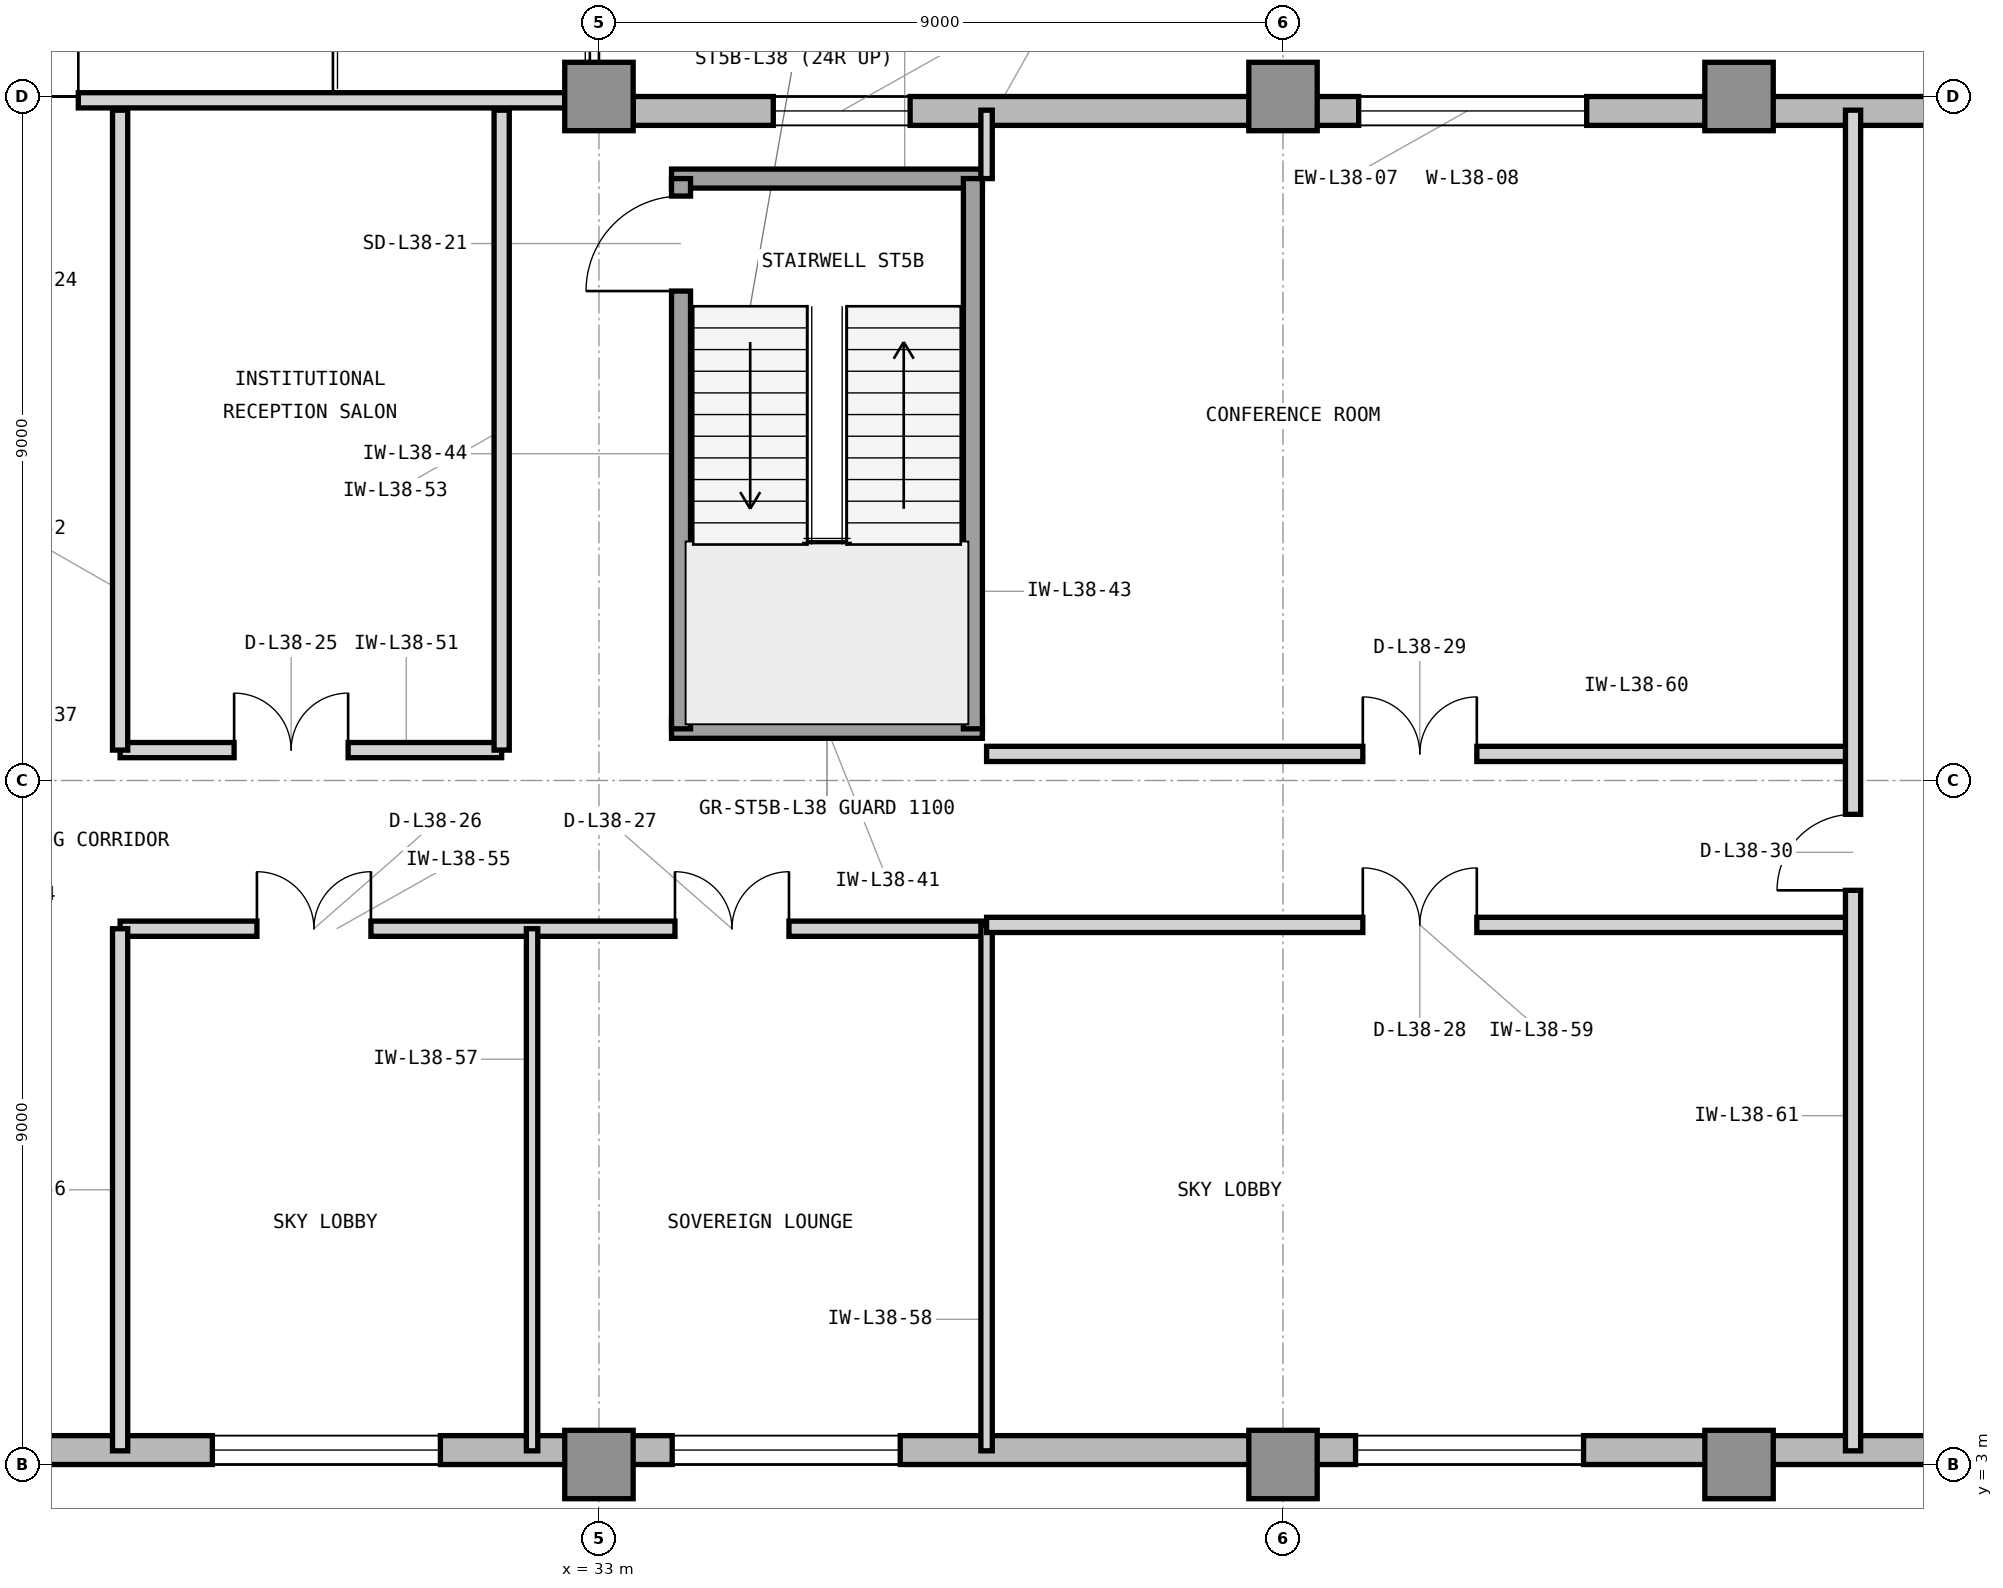
"""IFC4 building model, lengths in metres.
Left out: names, types, materials, properties, quantities, classifications, styles, units other than length and angle.
Written with IfcOpenShell. Run it as: python <this file> out.ifc"""

import sys

from ifc_helpers import new_model, si_unit, direction, frame, frame_2d, origin, origin_2d, place, context, subcontext, project, spatial, rectangle, extrude, element, fill, save


model = new_model("IFC4")
c1 = context("Model", 3, precision=1e-05, world=origin(), true_north=direction((0.0, 1.0)))
c2 = subcontext(c1, "Body", "Model", "MODEL_VIEW")
j1 = project(units=[si_unit("LENGTHUNIT", "METRE"), si_unit("PLANEANGLEUNIT", "RADIAN")], contexts=[c1])
p1 = place(None, origin())
s1 = spatial("IfcSite", under=j1, at=p1, CompositionType="ELEMENT")
p2 = place(p1, origin())
s2 = spatial("IfcBuilding", under=s1, at=p2, CompositionType="ELEMENT")
p3 = place(p2, frame((0.0, 0.0, 160.2)))
s3 = spatial("IfcBuildingStorey", under=s2, at=p3, CompositionType="ELEMENT", Elevation=160.2)
for number, where, z_axis, x_axis in (
    (1, (33.0, 3.0, 0.0), (0.0, 0.0, 1.0), (1.0, 0.0, 0.0)),
    (2, (33.0, 21.0, 0.0), (0.0, 0.0, 1.0), (1.0, 0.0, 0.0)),
    (3, (42.0, 3.0, 0.0), (0.0, 0.0, 1.0), (1.0, 0.0, 0.0)),
    (4, (42.0, 21.0, 0.0), (0.0, 0.0, 1.0), (1.0, 0.0, 0.0)),
    (5, (48.0, 3.0, 0.0), (0.0, 0.0, 1.0), (1.0, 0.0, 0.0)),
    (6, (48.0, 21.0, 0.0), (0.0, 0.0, 1.0), (1.0, 0.0, 0.0)),
):
    element("IfcColumn", number, at=place(p3, frame(where, z_axis=z_axis, x_axis=x_axis)), inside=s3, PredefinedType="COLUMN", context=c2, shape_type="SweptSolid", body=[
        extrude(rectangle(XDim=0.9, YDim=0.9, at=origin_2d()), origin(), (0.0, 0.0, 1.0), 4.2),
    ])
p4 = place(p3, frame((23.9, 3.19, 0.0), z_axis=(0.0, 0.0, 1.0), x_axis=(1.0, 0.0, 0.0)))
e7 = element("IfcWall", 7, at=p4, inside=s3, PredefinedType="STANDARD", context=c2, shape_type="SweptSolid", body=[
    extrude(rectangle(XDim=31.5, YDim=0.38, at=frame_2d((15.75, 0.0))), origin(), (0.0, 0.0, 1.0), 4.0),
])
p5 = place(p4, frame((4.014, 0.0, 0.7)))
e8 = element("IfcOpeningElement", 8, at=p5, cuts=e7, PredefinedType="OPENING", context=c2, shape_type="SweptSolid", body=[
    extrude(rectangle(XDim=3.0, YDim=2.6, at=frame_2d((1.5, 1.3))), frame((0.0, 0.2, 0.0), z_axis=(0.0, -1.0, 0.0), x_axis=(1.0, 0.0, 0.0)), (0.0, 0.0, 1.0), 0.4),
])
p6 = place(p4, frame((10.064, 0.0, 0.7)))
e9 = element("IfcOpeningElement", 9, at=p6, cuts=e7, PredefinedType="OPENING", context=c2, shape_type="SweptSolid", body=[
    extrude(rectangle(XDim=3.0, YDim=2.6, at=frame_2d((1.5, 1.3))), frame((0.0, 0.2, 0.0), z_axis=(0.0, -1.0, 0.0), x_axis=(1.0, 0.0, 0.0)), (0.0, 0.0, 1.0), 0.4),
])
p7 = place(p4, frame((19.054, 0.0, 0.7)))
e10 = element("IfcOpeningElement", 10, at=p7, cuts=e7, PredefinedType="OPENING", context=c2, shape_type="SweptSolid", body=[
    extrude(rectangle(XDim=3.0, YDim=2.6, at=frame_2d((1.5, 1.3))), frame((0.0, 0.2, 0.0), z_axis=(0.0, -1.0, 0.0), x_axis=(1.0, 0.0, 0.0)), (0.0, 0.0, 1.0), 0.4),
])
p8 = place(p3, frame((55.4, 20.81, 0.0), z_axis=(0.0, 0.0, 1.0), x_axis=(-1.0, 0.0, 0.0)))
e11 = element("IfcWall", 11, at=p8, inside=s3, PredefinedType="STANDARD", context=c2, shape_type="SweptSolid", body=[
    extrude(rectangle(XDim=21.95, YDim=0.38, at=frame_2d((10.975, 0.0))), origin(), (0.0, 0.0, 1.0), 4.0),
])
p9 = place(p8, frame((18.306, 0.0, 0.85)))
e12 = element("IfcOpeningElement", 12, at=p9, cuts=e11, PredefinedType="OPENING", context=c2, shape_type="SweptSolid", body=[
    extrude(rectangle(XDim=1.8, YDim=2.25, at=frame_2d((0.9, 1.125))), frame((0.0, 0.2, 0.0), z_axis=(0.0, -1.0, 0.0), x_axis=(1.0, 0.0, 0.0)), (0.0, 0.0, 1.0), 0.4),
])
p10 = place(p8, frame((9.404, 0.0, 0.7)))
e13 = element("IfcOpeningElement", 13, at=p10, cuts=e11, PredefinedType="OPENING", context=c2, shape_type="SweptSolid", body=[
    extrude(rectangle(XDim=3.0, YDim=2.6, at=frame_2d((1.5, 1.3))), frame((0.0, 0.2, 0.0), z_axis=(0.0, -1.0, 0.0), x_axis=(1.0, 0.0, 0.0)), (0.0, 0.0, 1.0), 0.4),
])
for number, where, z_axis, x_axis in (
    (14, (33.955, 12.68, 0.0), (0.0, 0.0, 1.0), (1.0, 0.0, 0.0)),
    (15, (33.955, 19.92, 0.0), (0.0, 0.0, 1.0), (1.0, 0.0, 0.0)),
):
    element("IfcWall", number, at=place(p3, frame(where, z_axis=z_axis, x_axis=x_axis)), inside=s3, PredefinedType="SHEAR", context=c2, shape_type="SweptSolid", body=[
        extrude(rectangle(XDim=4.09, YDim=0.25, at=frame_2d((2.045, 0.0))), origin(), (0.0, 0.0, 1.0), 4.2),
    ])
p11 = place(p3, frame((37.92, 12.68, 0.0), z_axis=(0.0, 0.0, 1.0), x_axis=(0.0, 1.0, 0.0)))
e16 = element("IfcWall", 16, at=p11, inside=s3, PredefinedType="SHEAR", context=c2, shape_type="SweptSolid", body=[
    extrude(rectangle(XDim=7.24, YDim=0.25, at=frame_2d((3.62, 0.0))), origin(), (0.0, 0.0, 1.0), 4.2),
])
p12 = place(p3, frame((34.08, 12.68, 0.0), z_axis=(0.0, 0.0, 1.0), x_axis=(0.0, 1.0, 0.0)))
e17 = element("IfcWall", 17, at=p12, inside=s3, PredefinedType="SHEAR", context=c2, shape_type="SweptSolid", body=[
    extrude(rectangle(XDim=7.24, YDim=0.25, at=frame_2d((3.62, 0.0))), origin(), (0.0, 0.0, 1.0), 4.2),
])
p13 = place(p12, frame((5.76, 0.0, 0.0)))
e18 = element("IfcOpeningElement", 18, at=p13, cuts=e17, PredefinedType="OPENING", context=c2, shape_type="SweptSolid", body=[
    extrude(rectangle(XDim=1.25, YDim=2.2, at=frame_2d((0.625, 1.1))), frame((0.0, 0.135, 0.0), z_axis=(0.0, -1.0, 0.0), x_axis=(1.0, 0.0, 0.0)), (0.0, 0.0, 1.0), 0.27),
])
p14 = place(p3, frame((24.05, 20.95, 0.0), z_axis=(0.0, 0.0, 1.0), x_axis=(1.0, 0.0, 0.0)))
e19 = element("IfcWall", 19, at=p14, inside=s3, PredefinedType="PARTITIONING", context=c2, shape_type="SweptSolid", body=[
    extrude(rectangle(XDim=8.5, YDim=0.2, at=frame_2d((4.25, 0.0))), origin(), (0.0, 0.0, 1.0), 3.386),
])
p15 = place(p14, frame((0.6, 0.0, 0.0)))
e20 = element("IfcOpeningElement", 20, at=p15, cuts=e19, PredefinedType="OPENING", context=c2, shape_type="SweptSolid", body=[
    extrude(rectangle(XDim=1.5, YDim=2.3, at=frame_2d((0.75, 1.15))), frame((0.0, 0.11, 0.0), z_axis=(0.0, -1.0, 0.0), x_axis=(1.0, 0.0, 0.0)), (0.0, 0.0, 1.0), 0.22),
])
p16 = place(p3, frame((26.7, 12.4, 0.0), z_axis=(0.0, 0.0, 1.0), x_axis=(1.0, 0.0, 0.0)))
e21 = element("IfcWall", 21, at=p16, inside=s3, PredefinedType="PARTITIONING", context=c2, shape_type="SweptSolid", body=[
    extrude(rectangle(XDim=5.02, YDim=0.2, at=frame_2d((2.51, 0.0))), origin(), (0.0, 0.0, 1.0), 3.93),
])
p17 = place(p16, frame((1.5, 0.0, 0.0)))
e22 = element("IfcOpeningElement", 22, at=p17, cuts=e21, PredefinedType="OPENING", context=c2, shape_type="SweptSolid", body=[
    extrude(rectangle(XDim=1.5, YDim=2.3, at=frame_2d((0.75, 1.15))), frame((0.0, 0.11, 0.0), z_axis=(0.0, -1.0, 0.0), x_axis=(1.0, 0.0, 0.0)), (0.0, 0.0, 1.0), 0.22),
])
for number, where, z_axis, x_axis in (
    (23, (26.7, 12.4, 0.0), (0.0, 0.0, 1.0), (0.0, 1.0, 0.0)),
    (24, (31.72, 12.4, 0.0), (0.0, 0.0, 1.0), (0.0, 1.0, 0.0)),
):
    element("IfcWall", number, at=place(p3, frame(where, z_axis=z_axis, x_axis=x_axis)), inside=s3, PredefinedType="PARTITIONING", context=c2, shape_type="SweptSolid", body=[
        extrude(rectangle(XDim=8.42, YDim=0.2, at=frame_2d((4.21, 0.0))), origin(), (0.0, 0.0, 1.0), 3.93),
    ])
p18 = place(p3, frame((38.1, 19.92, 0.0), z_axis=(0.0, 0.0, 1.0), x_axis=(0.0, 1.0, 0.0)))
e25 = element("IfcWall", 25, at=p18, inside=s3, PredefinedType="PARTITIONING", context=c2, shape_type="SweptSolid", body=[
    extrude(rectangle(XDim=0.9, YDim=0.15, at=frame_2d((0.45, 0.0))), origin(), (0.0, 0.0, 1.0), 3.93),
])
p19 = place(p3, frame((26.7, 10.05, 0.0), z_axis=(0.0, 0.0, 1.0), x_axis=(1.0, 0.0, 0.0)))
e26 = element("IfcWall", 26, at=p19, inside=s3, PredefinedType="PARTITIONING", context=c2, shape_type="SweptSolid", body=[
    extrude(rectangle(XDim=11.4, YDim=0.2, at=frame_2d((5.7, 0.0))), origin(), (0.0, 0.0, 1.0), 3.93),
])
p20 = place(p19, frame((1.8, 0.0, 0.0)))
e27 = element("IfcOpeningElement", 27, at=p20, cuts=e26, PredefinedType="OPENING", context=c2, shape_type="SweptSolid", body=[
    extrude(rectangle(XDim=1.5, YDim=2.3, at=frame_2d((0.75, 1.15))), frame((0.0, 0.11, 0.0), z_axis=(0.0, -1.0, 0.0), x_axis=(1.0, 0.0, 0.0)), (0.0, 0.0, 1.0), 0.22),
])
p21 = place(p19, frame((7.3, 0.0, 0.0)))
e28 = element("IfcOpeningElement", 28, at=p21, cuts=e26, PredefinedType="OPENING", context=c2, shape_type="SweptSolid", body=[
    extrude(rectangle(XDim=1.5, YDim=2.3, at=frame_2d((0.75, 1.15))), frame((0.0, 0.11, 0.0), z_axis=(0.0, -1.0, 0.0), x_axis=(1.0, 0.0, 0.0)), (0.0, 0.0, 1.0), 0.22),
])
p22 = place(p3, frame((26.7, 3.18, 0.0), z_axis=(0.0, 0.0, 1.0), x_axis=(0.0, 1.0, 0.0)))
e29 = element("IfcWall", 29, at=p22, inside=s3, PredefinedType="PARTITIONING", context=c2, shape_type="SweptSolid", body=[
    extrude(rectangle(XDim=6.87, YDim=0.2, at=frame_2d((3.435, 0.0))), origin(), (0.0, 0.0, 1.0), 3.93),
])
p23 = place(p3, frame((32.12, 3.18, 0.0), z_axis=(0.0, 0.0, 1.0), x_axis=(0.0, 1.0, 0.0)))
e30 = element("IfcWall", 30, at=p23, inside=s3, PredefinedType="PARTITIONING", context=c2, shape_type="SweptSolid", body=[
    extrude(rectangle(XDim=6.87, YDim=0.15, at=frame_2d((3.435, 0.0))), origin(), (0.0, 0.0, 1.0), 3.93),
])
p24 = place(p3, frame((38.1, 3.18, 0.0), z_axis=(0.0, 0.0, 1.0), x_axis=(0.0, 1.0, 0.0)))
e31 = element("IfcWall", 31, at=p24, inside=s3, PredefinedType="PARTITIONING", context=c2, shape_type="SweptSolid", body=[
    extrude(rectangle(XDim=6.92, YDim=0.15, at=frame_2d((3.46, 0.0))), origin(), (0.0, 0.0, 1.0), 3.93),
])
p25 = place(p3, frame((38.1, 10.1, 0.0), z_axis=(0.0, 0.0, 1.0), x_axis=(1.0, 0.0, 0.0)))
e32 = element("IfcWall", 32, at=p25, inside=s3, PredefinedType="PARTITIONING", context=c2, shape_type="SweptSolid", body=[
    extrude(rectangle(XDim=11.4, YDim=0.2, at=frame_2d((5.7, 0.0))), origin(), (0.0, 0.0, 1.0), 3.93),
])
p26 = place(p25, frame((4.95, 0.0, 0.0)))
e33 = element("IfcOpeningElement", 33, at=p26, cuts=e32, PredefinedType="OPENING", context=c2, shape_type="SweptSolid", body=[
    extrude(rectangle(XDim=1.5, YDim=2.3, at=frame_2d((0.75, 1.15))), frame((0.0, 0.11, 0.0), z_axis=(0.0, -1.0, 0.0), x_axis=(1.0, 0.0, 0.0)), (0.0, 0.0, 1.0), 0.22),
])
p27 = place(p3, frame((38.1, 12.35, 0.0), z_axis=(0.0, 0.0, 1.0), x_axis=(1.0, 0.0, 0.0)))
e34 = element("IfcWall", 34, at=p27, inside=s3, PredefinedType="PARTITIONING", context=c2, shape_type="SweptSolid", body=[
    extrude(rectangle(XDim=11.4, YDim=0.2, at=frame_2d((5.7, 0.0))), origin(), (0.0, 0.0, 1.0), 3.93),
])
p28 = place(p27, frame((4.95, 0.0, 0.0)))
e35 = element("IfcOpeningElement", 35, at=p28, cuts=e34, PredefinedType="OPENING", context=c2, shape_type="SweptSolid", body=[
    extrude(rectangle(XDim=1.5, YDim=2.3, at=frame_2d((0.75, 1.15))), frame((0.0, 0.11, 0.0), z_axis=(0.0, -1.0, 0.0), x_axis=(1.0, 0.0, 0.0)), (0.0, 0.0, 1.0), 0.22),
])
p29 = place(p3, frame((49.5, 3.18, 0.0), z_axis=(0.0, 0.0, 1.0), x_axis=(0.0, 1.0, 0.0)))
e36 = element("IfcWall", 36, at=p29, inside=s3, PredefinedType="PARTITIONING", context=c2, shape_type="SweptSolid", body=[
    extrude(rectangle(XDim=17.64, YDim=0.2, at=frame_2d((8.82, 0.0))), origin(), (0.0, 0.0, 1.0), 3.93),
])
p30 = place(p29, frame((7.375, 0.0, 0.0)))
e37 = element("IfcOpeningElement", 37, at=p30, cuts=e36, PredefinedType="OPENING", context=c2, shape_type="SweptSolid", body=[
    extrude(rectangle(XDim=1.0, YDim=2.15, at=frame_2d((0.5, 1.075))), frame((0.0, 0.11, 0.0), z_axis=(0.0, -1.0, 0.0), x_axis=(1.0, 0.0, 0.0)), (0.0, 0.0, 1.0), 0.22),
])
p31 = place(p9, origin())
e38 = element("IfcWindow", 38, at=p31, inside=s3, PartitioningType="SINGLE_PANEL", PredefinedType="WINDOW", context=c2, shape_type="SweptSolid", body=[
    extrude(rectangle(XDim=1.8, YDim=2.25, at=frame_2d((0.9, 1.125))), frame((0.0, 0.11, 0.0), z_axis=(0.0, -1.0, 0.0), x_axis=(1.0, 0.0, 0.0)), (0.0, 0.0, 1.0), 0.06),
])
fill(e12, e38)
p32 = place(p13, origin())
e39 = element("IfcDoor", 39, at=p32, inside=s3, OperationType="SINGLE_SWING_LEFT", PredefinedType="DOOR", context=c2, shape_type="SweptSolid", body=[
    extrude(rectangle(XDim=1.25, YDim=2.2, at=frame_2d((0.625, 1.1))), frame((0.0, 0.025, 0.0), z_axis=(0.0, -1.0, 0.0), x_axis=(1.0, 0.0, 0.0)), (0.0, 0.0, 1.0), 0.05),
])
fill(e18, e39)
p33 = place(p15, origin())
e40 = element("IfcDoor", 40, at=p33, inside=s3, OperationType="DOUBLE_DOOR_SINGLE_SWING", PredefinedType="DOOR", context=c2, shape_type="SweptSolid", body=[
    extrude(rectangle(XDim=1.5, YDim=2.3, at=frame_2d((0.75, 1.15))), frame((0.0, 0.025, 0.0), z_axis=(0.0, -1.0, 0.0), x_axis=(1.0, 0.0, 0.0)), (0.0, 0.0, 1.0), 0.05),
])
fill(e20, e40)
p34 = place(p17, origin())
e41 = element("IfcDoor", 41, at=p34, inside=s3, OperationType="DOUBLE_DOOR_SINGLE_SWING", PredefinedType="DOOR", context=c2, shape_type="SweptSolid", body=[
    extrude(rectangle(XDim=1.5, YDim=2.3, at=frame_2d((0.75, 1.15))), frame((0.0, 0.025, 0.0), z_axis=(0.0, -1.0, 0.0), x_axis=(1.0, 0.0, 0.0)), (0.0, 0.0, 1.0), 0.05),
])
fill(e22, e41)
p35 = place(p20, origin())
e42 = element("IfcDoor", 42, at=p35, inside=s3, OperationType="DOUBLE_DOOR_SINGLE_SWING", PredefinedType="DOOR", context=c2, shape_type="SweptSolid", body=[
    extrude(rectangle(XDim=1.5, YDim=2.3, at=frame_2d((0.75, 1.15))), frame((0.0, 0.025, 0.0), z_axis=(0.0, -1.0, 0.0), x_axis=(1.0, 0.0, 0.0)), (0.0, 0.0, 1.0), 0.05),
])
fill(e27, e42)
p36 = place(p21, origin())
e43 = element("IfcDoor", 43, at=p36, inside=s3, OperationType="DOUBLE_DOOR_SINGLE_SWING", PredefinedType="DOOR", context=c2, shape_type="SweptSolid", body=[
    extrude(rectangle(XDim=1.5, YDim=2.3, at=frame_2d((0.75, 1.15))), frame((0.0, 0.025, 0.0), z_axis=(0.0, -1.0, 0.0), x_axis=(1.0, 0.0, 0.0)), (0.0, 0.0, 1.0), 0.05),
])
fill(e28, e43)
p37 = place(p26, origin())
e44 = element("IfcDoor", 44, at=p37, inside=s3, OperationType="DOUBLE_DOOR_SINGLE_SWING", PredefinedType="DOOR", context=c2, shape_type="SweptSolid", body=[
    extrude(rectangle(XDim=1.5, YDim=2.3, at=frame_2d((0.75, 1.15))), frame((0.0, 0.025, 0.0), z_axis=(0.0, -1.0, 0.0), x_axis=(1.0, 0.0, 0.0)), (0.0, 0.0, 1.0), 0.05),
])
fill(e33, e44)
p38 = place(p28, origin())
e45 = element("IfcDoor", 45, at=p38, inside=s3, OperationType="DOUBLE_DOOR_SINGLE_SWING", PredefinedType="DOOR", context=c2, shape_type="SweptSolid", body=[
    extrude(rectangle(XDim=1.5, YDim=2.3, at=frame_2d((0.75, 1.15))), frame((0.0, 0.025, 0.0), z_axis=(0.0, -1.0, 0.0), x_axis=(1.0, 0.0, 0.0)), (0.0, 0.0, 1.0), 0.05),
])
fill(e35, e45)
p39 = place(p30, origin())
e46 = element("IfcDoor", 46, at=p39, inside=s3, OperationType="SINGLE_SWING_LEFT", PredefinedType="DOOR", context=c2, shape_type="SweptSolid", body=[
    extrude(rectangle(XDim=1.0, YDim=2.15, at=frame_2d((0.5, 1.075))), frame((0.0, 0.025, 0.0), z_axis=(0.0, -1.0, 0.0), x_axis=(1.0, 0.0, 0.0)), (0.0, 0.0, 1.0), 0.05),
])
fill(e37, e46)
p40 = place(p5, origin())
e47 = element("IfcWindow", 47, at=p40, inside=s3, PartitioningType="SINGLE_PANEL", PredefinedType="WINDOW", context=c2, shape_type="SweptSolid", body=[
    extrude(rectangle(XDim=3.0, YDim=2.6, at=frame_2d((1.5, 1.3))), frame((0.0, 0.11, 0.0), z_axis=(0.0, -1.0, 0.0), x_axis=(1.0, 0.0, 0.0)), (0.0, 0.0, 1.0), 0.06),
])
fill(e8, e47)
p41 = place(p6, origin())
e48 = element("IfcWindow", 48, at=p41, inside=s3, PartitioningType="SINGLE_PANEL", PredefinedType="WINDOW", context=c2, shape_type="SweptSolid", body=[
    extrude(rectangle(XDim=3.0, YDim=2.6, at=frame_2d((1.5, 1.3))), frame((0.0, 0.11, 0.0), z_axis=(0.0, -1.0, 0.0), x_axis=(1.0, 0.0, 0.0)), (0.0, 0.0, 1.0), 0.06),
])
fill(e9, e48)
p42 = place(p7, origin())
e49 = element("IfcWindow", 49, at=p42, inside=s3, PartitioningType="SINGLE_PANEL", PredefinedType="WINDOW", context=c2, shape_type="SweptSolid", body=[
    extrude(rectangle(XDim=3.0, YDim=2.6, at=frame_2d((1.5, 1.3))), frame((0.0, 0.11, 0.0), z_axis=(0.0, -1.0, 0.0), x_axis=(1.0, 0.0, 0.0)), (0.0, 0.0, 1.0), 0.06),
])
fill(e10, e49)
p43 = place(p10, origin())
e50 = element("IfcWindow", 50, at=p43, inside=s3, PartitioningType="SINGLE_PANEL", PredefinedType="WINDOW", context=c2, shape_type="SweptSolid", body=[
    extrude(rectangle(XDim=3.0, YDim=2.6, at=frame_2d((1.5, 1.3))), frame((0.0, 0.11, 0.0), z_axis=(0.0, -1.0, 0.0), x_axis=(1.0, 0.0, 0.0)), (0.0, 0.0, 1.0), 0.06),
])
fill(e13, e50)
save(model, sys.argv[1])
